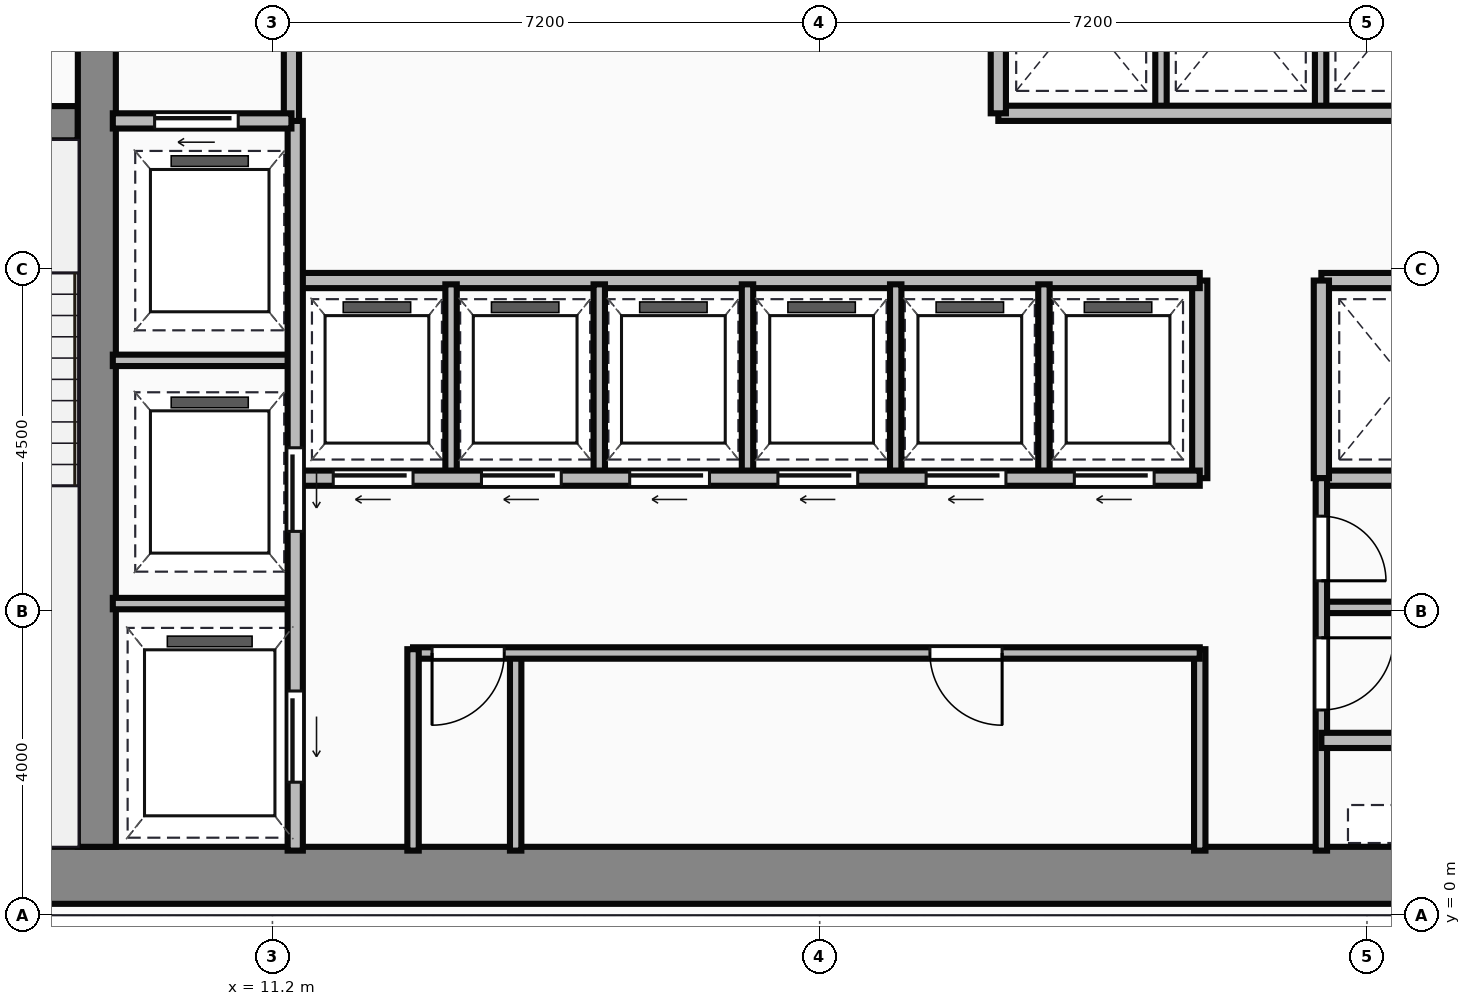
"""IFC4 building model, lengths in metres.
Left out: names, types, materials, properties, quantities, classifications, styles, units other than length and angle.
Written with IfcOpenShell. Run it as: python <this file> out.ifc"""

import sys

from ifc_helpers import new_model, si_unit, direction, frame, frame_2d, origin, place, context, subcontext, project, spatial, rectangle, extrude, source, transform, mapped, element, fill, save


model = new_model("IFC4")
c1 = context("Model", 3, precision=1e-05, world=origin(), true_north=direction((0.0, 1.0)))
c2 = subcontext(c1, "Body", "Model", "MODEL_VIEW")
j1 = project(units=[si_unit("LENGTHUNIT", "METRE"), si_unit("PLANEANGLEUNIT", "RADIAN")], contexts=[c1])
p1 = place(None, origin())
s1 = spatial("IfcSite", under=j1, at=p1, CompositionType="ELEMENT")
p2 = place(p1, origin())
s2 = spatial("IfcBuilding", under=s1, at=p2, CompositionType="ELEMENT")
p3 = place(p2, frame((0.0, 0.0, 88.65)))
s3 = spatial("IfcBuildingStorey", under=s2, at=p3, CompositionType="ELEMENT", Elevation=88.65)
m1 = source(origin(), c2, "Body", "SweptSolid", [
    extrude(rectangle(XDim=29.5, YDim=0.75, at=frame_2d((14.75, 0.0))), origin(), (0.0, 0.0, 1.0), 3.65),
])
p4 = place(p3, frame((4.5, 0.525, 0.0), z_axis=(0.0, 0.0, 1.0), x_axis=(1.0, 0.0, 0.0)))
e1 = element("IfcWall", 1, at=p4, inside=s3, PredefinedType="SHEAR", context=c2, shape_type="MappedRepresentation", body=[
    mapped(m1, transform((0.0, 0.0, 0.0))),
])
m2 = source(origin(), c2, "Body", "SweptSolid", [
    extrude(rectangle(XDim=12.35, YDim=0.5, at=frame_2d((6.175, 0.0))), origin(), (0.0, 0.0, 1.0), 3.65),
])
p5 = place(p3, frame((8.89, 0.9, 0.0), z_axis=(0.0, 0.0, 1.0), x_axis=(0.0, 1.0, 0.0)))
e2 = element("IfcWall", 2, at=p5, inside=s3, PredefinedType="SHEAR", context=c2, shape_type="MappedRepresentation", body=[
    mapped(m2, transform((0.0, 0.0, 0.0))),
])
m3 = source(origin(), c2, "Body", "SweptSolid", [
    extrude(rectangle(XDim=3.39, YDim=0.45, at=frame_2d((1.695, 0.0))), origin(), (0.0, 0.0, 1.0), 3.65),
])
p6 = place(p3, frame((5.25, 10.42, 0.0), z_axis=(0.0, 0.0, 1.0), x_axis=(1.0, 0.0, 0.0)))
e3 = element("IfcWall", 3, at=p6, inside=s3, PredefinedType="SHEAR", context=c2, shape_type="MappedRepresentation", body=[
    mapped(m3, transform((0.0, 0.0, 0.0))),
])
p7 = place(p6, frame((1.05, 0.0, 0.0)))
e4 = element("IfcOpeningElement", 4, at=p7, cuts=e3, PredefinedType="OPENING", context=c2, shape_type="SweptSolid", body=[
    extrude(rectangle(XDim=1.1, YDim=2.15, at=frame_2d((0.55, 1.075))), frame((0.0, 0.235, 0.0), z_axis=(0.0, -1.0, 0.0), x_axis=(1.0, 0.0, 0.0)), (0.0, 0.0, 1.0), 0.47),
])
m4 = source(origin(), c2, "Body", "SweptSolid", [
    extrude(rectangle(XDim=3.18, YDim=0.2, at=frame_2d((1.59, 0.0))), origin(), (0.0, 0.0, 1.0), 3.4),
])
p8 = place(p3, frame((11.45, 10.42, 0.0), z_axis=(0.0, 0.0, 1.0), x_axis=(0.0, 1.0, 0.0)))
e5 = element("IfcWall", 5, at=p8, inside=s3, PredefinedType="PARTITIONING", context=c2, shape_type="MappedRepresentation", body=[
    mapped(m4, transform((0.0, 0.0, 0.0))),
])
m5 = source(origin(), c2, "Body", "SweptSolid", [
    extrude(rectangle(XDim=2.35, YDim=0.2, at=frame_2d((1.175, 0.0))), origin(), (0.0, 0.0, 1.0), 3.4),
])
p9 = place(p3, frame((9.1, 10.45, 0.0), z_axis=(0.0, 0.0, 1.0), x_axis=(1.0, 0.0, 0.0)))
e6 = element("IfcWall", 6, at=p9, inside=s3, PredefinedType="PARTITIONING", context=c2, shape_type="MappedRepresentation", body=[
    mapped(m5, transform((0.0, 0.0, 0.0))),
])
p10 = place(p9, frame((0.55, 0.0, 0.0)))
e7 = element("IfcOpeningElement", 7, at=p10, cuts=e6, PredefinedType="OPENING", context=c2, shape_type="SweptSolid", body=[
    extrude(rectangle(XDim=1.1, YDim=2.15, at=frame_2d((0.55, 1.075))), frame((0.0, 0.11, 0.0), z_axis=(0.0, -1.0, 0.0), x_axis=(1.0, 0.0, 0.0)), (0.0, 0.0, 1.0), 0.22),
])
m6 = source(origin(), c2, "Body", "SweptSolid", [
    extrude(rectangle(XDim=9.6, YDim=0.2, at=frame_2d((4.8, 0.0))), origin(), (0.0, 0.0, 1.0), 3.4),
])
p11 = place(p3, frame((11.5, 0.85, 0.0), z_axis=(0.0, 0.0, 1.0), x_axis=(0.0, 1.0, 0.0)))
e8 = element("IfcWall", 8, at=p11, inside=s3, PredefinedType="PARTITIONING", context=c2, shape_type="MappedRepresentation", body=[
    mapped(m6, transform((0.0, 0.0, 0.0))),
])
p12 = place(p11, frame((4.2, 0.0, 0.0)))
e9 = element("IfcOpeningElement", 9, at=p12, cuts=e8, PredefinedType="OPENING", context=c2, shape_type="SweptSolid", body=[
    extrude(rectangle(XDim=1.1, YDim=2.15, at=frame_2d((0.55, 1.075))), frame((0.0, 0.11, 0.0), z_axis=(0.0, -1.0, 0.0), x_axis=(1.0, 0.0, 0.0)), (0.0, 0.0, 1.0), 0.22),
])
p13 = place(p11, frame((0.9, 0.0, 0.0)))
e10 = element("IfcOpeningElement", 10, at=p13, cuts=e8, PredefinedType="OPENING", context=c2, shape_type="SweptSolid", body=[
    extrude(rectangle(XDim=1.2, YDim=2.15, at=frame_2d((0.6, 1.075))), frame((0.0, 0.11, 0.0), z_axis=(0.0, -1.0, 0.0), x_axis=(1.0, 0.0, 0.0)), (0.0, 0.0, 1.0), 0.22),
])
m7 = source(origin(), c2, "Body", "SweptSolid", [
    extrude(rectangle(XDim=2.4, YDim=0.15, at=frame_2d((1.2, 0.0))), origin(), (0.0, 0.0, 1.0), 3.4),
])
for number, where, z_axis, x_axis in (
    (11, (9.1, 4.1, 0.0), (0.0, 0.0, 1.0), (1.0, 0.0, 0.0)),
    (12, (9.1, 7.3, 0.0), (0.0, 0.0, 1.0), (1.0, 0.0, 0.0)),
):
    element("IfcWall", number, at=place(p3, frame(where, z_axis=z_axis, x_axis=x_axis)), inside=s3, PredefinedType="PARTITIONING", context=c2, shape_type="MappedRepresentation", body=[
        mapped(m7, transform((0.0, 0.0, 0.0))),
    ])
m8 = source(origin(), c2, "Body", "SweptSolid", [
    extrude(rectangle(XDim=2.65, YDim=0.15, at=frame_2d((1.325, 0.0))), origin(), (0.0, 0.0, 1.0), 3.4),
])
p14 = place(p3, frame((13.05, 0.85, 0.0), z_axis=(0.0, 0.0, 1.0), x_axis=(0.0, 1.0, 0.0)))
e13 = element("IfcWall", 13, at=p14, inside=s3, PredefinedType="PARTITIONING", context=c2, shape_type="MappedRepresentation", body=[
    mapped(m8, transform((0.0, 0.0, 0.0))),
])
m9 = source(origin(), c2, "Body", "SweptSolid", [
    extrude(rectangle(XDim=10.35, YDim=0.15, at=frame_2d((5.175, 0.0))), origin(), (0.0, 0.0, 1.0), 3.4),
])
p15 = place(p3, frame((13.05, 3.45, 0.0), z_axis=(0.0, 0.0, 1.0), x_axis=(1.0, 0.0, 0.0)))
e14 = element("IfcWall", 14, at=p15, inside=s3, PredefinedType="PARTITIONING", context=c2, shape_type="MappedRepresentation", body=[
    mapped(m9, transform((0.0, 0.0, 0.0))),
])
p16 = place(p15, frame((0.25, 0.0, 0.0)))
e15 = element("IfcOpeningElement", 15, at=p16, cuts=e14, PredefinedType="OPENING", context=c2, shape_type="SweptSolid", body=[
    extrude(rectangle(XDim=0.95, YDim=2.15, at=frame_2d((0.475, 1.075))), frame((0.0, 0.085, 0.0), z_axis=(0.0, -1.0, 0.0), x_axis=(1.0, 0.0, 0.0)), (0.0, 0.0, 1.0), 0.17),
])
p17 = place(p15, frame((6.8, 0.0, 0.0)))
e16 = element("IfcOpeningElement", 16, at=p17, cuts=e14, PredefinedType="OPENING", context=c2, shape_type="SweptSolid", body=[
    extrude(rectangle(XDim=0.95, YDim=2.15, at=frame_2d((0.475, 1.075))), frame((0.0, 0.085, 0.0), z_axis=(0.0, -1.0, 0.0), x_axis=(1.0, 0.0, 0.0)), (0.0, 0.0, 1.0), 0.17),
])
p18 = place(p3, frame((23.4, 0.85, 0.0), z_axis=(0.0, 0.0, 1.0), x_axis=(0.0, 1.0, 0.0)))
e17 = element("IfcWall", 17, at=p18, inside=s3, PredefinedType="PARTITIONING", context=c2, shape_type="MappedRepresentation", body=[
    mapped(m8, transform((0.0, 0.0, 0.0))),
])
m10 = source(origin(), c2, "Body", "SweptSolid", [
    extrude(rectangle(XDim=2.6, YDim=0.15, at=frame_2d((1.3, 0.0))), origin(), (0.0, 0.0, 1.0), 3.4),
])
p19 = place(p3, frame((14.4, 0.85, 0.0), z_axis=(0.0, 0.0, 1.0), x_axis=(0.0, 1.0, 0.0)))
e18 = element("IfcWall", 18, at=p19, inside=s3, PredefinedType="PARTITIONING", context=c2, shape_type="MappedRepresentation", body=[
    mapped(m10, transform((0.0, 0.0, 0.0))),
])
m11 = source(origin(), c2, "Body", "SweptSolid", [
    extrude(rectangle(XDim=11.85, YDim=0.2, at=frame_2d((5.925, 0.0))), origin(), (0.0, 0.0, 1.0), 3.4),
])
p20 = place(p3, frame((11.55, 5.75, 0.0), z_axis=(0.0, 0.0, 1.0), x_axis=(1.0, 0.0, 0.0)))
e19 = element("IfcWall", 19, at=p20, inside=s3, PredefinedType="PARTITIONING", context=c2, shape_type="MappedRepresentation", body=[
    mapped(m11, transform((0.0, 0.0, 0.0))),
])
p21 = place(p20, frame((0.45, 0.0, 0.0)))
e20 = element("IfcOpeningElement", 20, at=p21, cuts=e19, PredefinedType="OPENING", context=c2, shape_type="SweptSolid", body=[
    extrude(rectangle(XDim=1.05, YDim=2.15, at=frame_2d((0.525, 1.075))), frame((0.0, 0.11, 0.0), z_axis=(0.0, -1.0, 0.0), x_axis=(1.0, 0.0, 0.0)), (0.0, 0.0, 1.0), 0.22),
])
p22 = place(p20, frame((2.4, 0.0, 0.0)))
e21 = element("IfcOpeningElement", 21, at=p22, cuts=e19, PredefinedType="OPENING", context=c2, shape_type="SweptSolid", body=[
    extrude(rectangle(XDim=1.05, YDim=2.15, at=frame_2d((0.525, 1.075))), frame((0.0, 0.11, 0.0), z_axis=(0.0, -1.0, 0.0), x_axis=(1.0, 0.0, 0.0)), (0.0, 0.0, 1.0), 0.22),
])
p23 = place(p20, frame((4.35, 0.0, 0.0)))
e22 = element("IfcOpeningElement", 22, at=p23, cuts=e19, PredefinedType="OPENING", context=c2, shape_type="SweptSolid", body=[
    extrude(rectangle(XDim=1.05, YDim=2.15, at=frame_2d((0.525, 1.075))), frame((0.0, 0.11, 0.0), z_axis=(0.0, -1.0, 0.0), x_axis=(1.0, 0.0, 0.0)), (0.0, 0.0, 1.0), 0.22),
])
p24 = place(p20, frame((6.3, 0.0, 0.0)))
e23 = element("IfcOpeningElement", 23, at=p24, cuts=e19, PredefinedType="OPENING", context=c2, shape_type="SweptSolid", body=[
    extrude(rectangle(XDim=1.05, YDim=2.15, at=frame_2d((0.525, 1.075))), frame((0.0, 0.11, 0.0), z_axis=(0.0, -1.0, 0.0), x_axis=(1.0, 0.0, 0.0)), (0.0, 0.0, 1.0), 0.22),
])
p25 = place(p20, frame((8.25, 0.0, 0.0)))
e24 = element("IfcOpeningElement", 24, at=p25, cuts=e19, PredefinedType="OPENING", context=c2, shape_type="SweptSolid", body=[
    extrude(rectangle(XDim=1.05, YDim=2.15, at=frame_2d((0.525, 1.075))), frame((0.0, 0.11, 0.0), z_axis=(0.0, -1.0, 0.0), x_axis=(1.0, 0.0, 0.0)), (0.0, 0.0, 1.0), 0.22),
])
p26 = place(p20, frame((10.2, 0.0, 0.0)))
e25 = element("IfcOpeningElement", 25, at=p26, cuts=e19, PredefinedType="OPENING", context=c2, shape_type="SweptSolid", body=[
    extrude(rectangle(XDim=1.05, YDim=2.15, at=frame_2d((0.525, 1.075))), frame((0.0, 0.11, 0.0), z_axis=(0.0, -1.0, 0.0), x_axis=(1.0, 0.0, 0.0)), (0.0, 0.0, 1.0), 0.22),
])
p27 = place(p3, frame((11.55, 8.35, 0.0), z_axis=(0.0, 0.0, 1.0), x_axis=(1.0, 0.0, 0.0)))
e26 = element("IfcWall", 26, at=p27, inside=s3, PredefinedType="PARTITIONING", context=c2, shape_type="MappedRepresentation", body=[
    mapped(m11, transform((0.0, 0.0, 0.0))),
])
m12 = source(origin(), c2, "Body", "SweptSolid", [
    extrude(rectangle(XDim=2.6, YDim=0.2, at=frame_2d((1.3, 0.0))), origin(), (0.0, 0.0, 1.0), 3.4),
])
p28 = place(p3, frame((23.4, 5.75, 0.0), z_axis=(0.0, 0.0, 1.0), x_axis=(0.0, 1.0, 0.0)))
e27 = element("IfcWall", 27, at=p28, inside=s3, PredefinedType="PARTITIONING", context=c2, shape_type="MappedRepresentation", body=[
    mapped(m12, transform((0.0, 0.0, 0.0))),
])
m13 = source(origin(), c2, "Body", "SweptSolid", [
    extrude(rectangle(XDim=2.5, YDim=0.15, at=frame_2d((1.25, 0.0))), origin(), (0.0, 0.0, 1.0), 3.4),
])
for number, where, z_axis, x_axis in (
    (28, (13.55, 5.8, 0.0), (0.0, 0.0, 1.0), (0.0, 1.0, 0.0)),
    (29, (15.5, 5.8, 0.0), (0.0, 0.0, 1.0), (0.0, 1.0, 0.0)),
    (30, (17.45, 5.8, 0.0), (0.0, 0.0, 1.0), (0.0, 1.0, 0.0)),
    (31, (19.4, 5.8, 0.0), (0.0, 0.0, 1.0), (0.0, 1.0, 0.0)),
    (32, (21.35, 5.8, 0.0), (0.0, 0.0, 1.0), (0.0, 1.0, 0.0)),
):
    element("IfcWall", number, at=place(p3, frame(where, z_axis=z_axis, x_axis=x_axis)), inside=s3, PredefinedType="PARTITIONING", context=c2, shape_type="MappedRepresentation", body=[
        mapped(m13, transform((0.0, 0.0, 0.0))),
    ])
m14 = source(origin(), c2, "Body", "SweptSolid", [
    extrude(rectangle(XDim=8.8, YDim=0.2, at=frame_2d((4.4, 0.0))), origin(), (0.0, 0.0, 1.0), 3.4),
])
p29 = place(p3, frame((20.75, 10.55, 0.0), z_axis=(0.0, 0.0, 1.0), x_axis=(1.0, 0.0, 0.0)))
e33 = element("IfcWall", 33, at=p29, inside=s3, PredefinedType="PARTITIONING", context=c2, shape_type="MappedRepresentation", body=[
    mapped(m14, transform((0.0, 0.0, 0.0))),
])
m15 = source(origin(), c2, "Body", "SweptSolid", [
    extrude(rectangle(XDim=3.0, YDim=0.2, at=frame_2d((1.5, 0.0))), origin(), (0.0, 0.0, 1.0), 3.4),
])
p30 = place(p3, frame((20.75, 10.55, 0.0), z_axis=(0.0, 0.0, 1.0), x_axis=(0.0, 1.0, 0.0)))
e34 = element("IfcWall", 34, at=p30, inside=s3, PredefinedType="PARTITIONING", context=c2, shape_type="MappedRepresentation", body=[
    mapped(m15, transform((0.0, 0.0, 0.0))),
])
m16 = source(origin(), c2, "Body", "SweptSolid", [
    extrude(rectangle(XDim=2.85, YDim=0.15, at=frame_2d((1.425, 0.0))), origin(), (0.0, 0.0, 1.0), 3.4),
])
for number, where, z_axis, x_axis in (
    (35, (22.89, 10.6, 0.0), (0.0, 0.0, 1.0), (0.0, 1.0, 0.0)),
    (36, (24.99, 10.6, 0.0), (0.0, 0.0, 1.0), (0.0, 1.0, 0.0)),
):
    element("IfcWall", number, at=place(p3, frame(where, z_axis=z_axis, x_axis=x_axis)), inside=s3, PredefinedType="PARTITIONING", context=c2, shape_type="MappedRepresentation", body=[
        mapped(m16, transform((0.0, 0.0, 0.0))),
    ])
m17 = source(origin(), c2, "Body", "SweptSolid", [
    extrude(rectangle(XDim=4.55, YDim=0.2, at=frame_2d((2.275, 0.0))), origin(), (0.0, 0.0, 1.0), 3.4),
])
for number, where, z_axis, x_axis in (
    (37, (25.0, 8.35, 0.0), (0.0, 0.0, 1.0), (1.0, 0.0, 0.0)),
    (38, (25.0, 5.75, 0.0), (0.0, 0.0, 1.0), (1.0, 0.0, 0.0)),
):
    element("IfcWall", number, at=place(p3, frame(where, z_axis=z_axis, x_axis=x_axis)), inside=s3, PredefinedType="PARTITIONING", context=c2, shape_type="MappedRepresentation", body=[
        mapped(m17, transform((0.0, 0.0, 0.0))),
    ])
p31 = place(p3, frame((25.0, 5.75, 0.0), z_axis=(0.0, 0.0, 1.0), x_axis=(0.0, 1.0, 0.0)))
e39 = element("IfcWall", 39, at=p31, inside=s3, PredefinedType="PARTITIONING", context=c2, shape_type="MappedRepresentation", body=[
    mapped(m12, transform((0.0, 0.0, 0.0))),
])
m18 = source(origin(), c2, "Body", "SweptSolid", [
    extrude(rectangle(XDim=4.9, YDim=0.15, at=frame_2d((2.45, 0.0))), origin(), (0.0, 0.0, 1.0), 3.4),
])
p32 = place(p3, frame((25.0, 0.85, 0.0), z_axis=(0.0, 0.0, 1.0), x_axis=(0.0, 1.0, 0.0)))
e40 = element("IfcWall", 40, at=p32, inside=s3, PredefinedType="PARTITIONING", context=c2, shape_type="MappedRepresentation", body=[
    mapped(m18, transform((0.0, 0.0, 0.0))),
])
p33 = place(p32, frame((1.85, 0.0, 0.0)))
e41 = element("IfcOpeningElement", 41, at=p33, cuts=e40, PredefinedType="OPENING", context=c2, shape_type="SweptSolid", body=[
    extrude(rectangle(XDim=0.95, YDim=2.15, at=frame_2d((0.475, 1.075))), frame((0.0, 0.085, 0.0), z_axis=(0.0, -1.0, 0.0), x_axis=(1.0, 0.0, 0.0)), (0.0, 0.0, 1.0), 0.17),
])
p34 = place(p32, frame((3.55, 0.0, 0.0)))
e42 = element("IfcOpeningElement", 42, at=p34, cuts=e40, PredefinedType="OPENING", context=c2, shape_type="SweptSolid", body=[
    extrude(rectangle(XDim=0.85, YDim=2.15, at=frame_2d((0.425, 1.075))), frame((0.0, 0.085, 0.0), z_axis=(0.0, -1.0, 0.0), x_axis=(1.0, 0.0, 0.0)), (0.0, 0.0, 1.0), 0.17),
])
m19 = source(origin(), c2, "Body", "SweptSolid", [
    extrude(rectangle(XDim=2.4, YDim=0.2, at=frame_2d((1.2, 0.0))), origin(), (0.0, 0.0, 1.0), 3.4),
])
p35 = place(p3, frame((25.0, 2.3, 0.0), z_axis=(0.0, 0.0, 1.0), x_axis=(1.0, 0.0, 0.0)))
e43 = element("IfcWall", 43, at=p35, inside=s3, PredefinedType="PARTITIONING", context=c2, shape_type="MappedRepresentation", body=[
    mapped(m19, transform((0.0, 0.0, 0.0))),
])
m20 = source(origin(), c2, "Body", "SweptSolid", [
    extrude(rectangle(XDim=4.55, YDim=0.15, at=frame_2d((2.275, 0.0))), origin(), (0.0, 0.0, 1.0), 3.4),
])
p36 = place(p3, frame((25.0, 4.05, 0.0), z_axis=(0.0, 0.0, 1.0), x_axis=(1.0, 0.0, 0.0)))
e44 = element("IfcWall", 44, at=p36, inside=s3, PredefinedType="PARTITIONING", context=c2, shape_type="MappedRepresentation", body=[
    mapped(m20, transform((0.0, 0.0, 0.0))),
])
m21 = source(origin(), c2, "Body", "SweptSolid", [
    extrude(rectangle(XDim=1.1, YDim=2.15, at=frame_2d((0.55, 1.075))), frame((0.0, 0.025, 0.0), z_axis=(0.0, -1.0, 0.0), x_axis=(1.0, 0.0, 0.0)), (0.0, 0.0, 1.0), 0.05),
])
p37 = place(p10, origin())
e45 = element("IfcDoor", 45, at=p37, inside=s3, OperationType="SLIDING_TO_LEFT", PredefinedType="DOOR", context=c2, shape_type="MappedRepresentation", body=[
    mapped(m21, transform((0.0, 0.0, 0.0))),
])
fill(e7, e45)
p38 = place(p12, frame((1.1, 0.0, 0.0), z_axis=(0.0, 0.0, 1.0), x_axis=(-1.0, 0.0, 0.0)))
e46 = element("IfcDoor", 46, at=p38, inside=s3, OperationType="SLIDING_TO_LEFT", PredefinedType="DOOR", context=c2, shape_type="MappedRepresentation", body=[
    mapped(m21, transform((0.0, 0.0, 0.0))),
])
fill(e9, e46)
m22 = source(origin(), c2, "Body", "SweptSolid", [
    extrude(rectangle(XDim=1.2, YDim=2.15, at=frame_2d((0.6, 1.075))), frame((0.0, 0.025, 0.0), z_axis=(0.0, -1.0, 0.0), x_axis=(1.0, 0.0, 0.0)), (0.0, 0.0, 1.0), 0.05),
])
p39 = place(p13, frame((1.2, 0.0, 0.0), z_axis=(0.0, 0.0, 1.0), x_axis=(-1.0, 0.0, 0.0)))
e47 = element("IfcDoor", 47, at=p39, inside=s3, OperationType="SLIDING_TO_LEFT", PredefinedType="DOOR", context=c2, shape_type="MappedRepresentation", body=[
    mapped(m22, transform((0.0, 0.0, 0.0))),
])
fill(e10, e47)
m23 = source(origin(), c2, "Body", "SweptSolid", [
    extrude(rectangle(XDim=0.95, YDim=2.15, at=frame_2d((0.475, 1.075))), frame((0.0, 0.025, 0.0), z_axis=(0.0, -1.0, 0.0), x_axis=(1.0, 0.0, 0.0)), (0.0, 0.0, 1.0), 0.05),
])
p40 = place(p16, origin())
e48 = element("IfcDoor", 48, at=p40, inside=s3, OperationType="SINGLE_SWING_LEFT", PredefinedType="DOOR", context=c2, shape_type="MappedRepresentation", body=[
    mapped(m23, transform((0.0, 0.0, 0.0))),
])
fill(e15, e48)
p41 = place(p17, origin())
e49 = element("IfcDoor", 49, at=p41, inside=s3, OperationType="SINGLE_SWING_RIGHT", PredefinedType="DOOR", context=c2, shape_type="MappedRepresentation", body=[
    mapped(m23, transform((0.0, 0.0, 0.0))),
])
fill(e16, e49)
m24 = source(origin(), c2, "Body", "SweptSolid", [
    extrude(rectangle(XDim=1.05, YDim=2.15, at=frame_2d((0.525, 1.075))), frame((0.0, 0.025, 0.0), z_axis=(0.0, -1.0, 0.0), x_axis=(1.0, 0.0, 0.0)), (0.0, 0.0, 1.0), 0.05),
])
p42 = place(p21, frame((1.05, 0.0, 0.0), z_axis=(0.0, 0.0, 1.0), x_axis=(-1.0, 0.0, 0.0)))
e50 = element("IfcDoor", 50, at=p42, inside=s3, OperationType="SLIDING_TO_LEFT", PredefinedType="DOOR", context=c2, shape_type="MappedRepresentation", body=[
    mapped(m24, transform((0.0, 0.0, 0.0))),
])
fill(e20, e50)
p43 = place(p22, frame((1.05, 0.0, 0.0), z_axis=(0.0, 0.0, 1.0), x_axis=(-1.0, 0.0, 0.0)))
e51 = element("IfcDoor", 51, at=p43, inside=s3, OperationType="SLIDING_TO_LEFT", PredefinedType="DOOR", context=c2, shape_type="MappedRepresentation", body=[
    mapped(m24, transform((0.0, 0.0, 0.0))),
])
fill(e21, e51)
p44 = place(p23, frame((1.05, 0.0, 0.0), z_axis=(0.0, 0.0, 1.0), x_axis=(-1.0, 0.0, 0.0)))
e52 = element("IfcDoor", 52, at=p44, inside=s3, OperationType="SLIDING_TO_LEFT", PredefinedType="DOOR", context=c2, shape_type="MappedRepresentation", body=[
    mapped(m24, transform((0.0, 0.0, 0.0))),
])
fill(e22, e52)
p45 = place(p24, frame((1.05, 0.0, 0.0), z_axis=(0.0, 0.0, 1.0), x_axis=(-1.0, 0.0, 0.0)))
e53 = element("IfcDoor", 53, at=p45, inside=s3, OperationType="SLIDING_TO_LEFT", PredefinedType="DOOR", context=c2, shape_type="MappedRepresentation", body=[
    mapped(m24, transform((0.0, 0.0, 0.0))),
])
fill(e23, e53)
p46 = place(p25, frame((1.05, 0.0, 0.0), z_axis=(0.0, 0.0, 1.0), x_axis=(-1.0, 0.0, 0.0)))
e54 = element("IfcDoor", 54, at=p46, inside=s3, OperationType="SLIDING_TO_LEFT", PredefinedType="DOOR", context=c2, shape_type="MappedRepresentation", body=[
    mapped(m24, transform((0.0, 0.0, 0.0))),
])
fill(e24, e54)
p47 = place(p26, frame((1.05, 0.0, 0.0), z_axis=(0.0, 0.0, 1.0), x_axis=(-1.0, 0.0, 0.0)))
e55 = element("IfcDoor", 55, at=p47, inside=s3, OperationType="SLIDING_TO_LEFT", PredefinedType="DOOR", context=c2, shape_type="MappedRepresentation", body=[
    mapped(m24, transform((0.0, 0.0, 0.0))),
])
fill(e25, e55)
p48 = place(p33, origin())
e56 = element("IfcDoor", 56, at=p48, inside=s3, OperationType="SINGLE_SWING_RIGHT", PredefinedType="DOOR", context=c2, shape_type="MappedRepresentation", body=[
    mapped(m23, transform((0.0, 0.0, 0.0))),
])
fill(e41, e56)
m25 = source(origin(), c2, "Body", "SweptSolid", [
    extrude(rectangle(XDim=0.85, YDim=2.15, at=frame_2d((0.425, 1.075))), frame((0.0, 0.025, 0.0), z_axis=(0.0, -1.0, 0.0), x_axis=(1.0, 0.0, 0.0)), (0.0, 0.0, 1.0), 0.05),
])
p49 = place(p34, origin())
e57 = element("IfcDoor", 57, at=p49, inside=s3, OperationType="SINGLE_SWING_LEFT", PredefinedType="DOOR", context=c2, shape_type="MappedRepresentation", body=[
    mapped(m25, transform((0.0, 0.0, 0.0))),
])
fill(e42, e57)
save(model, sys.argv[1])
